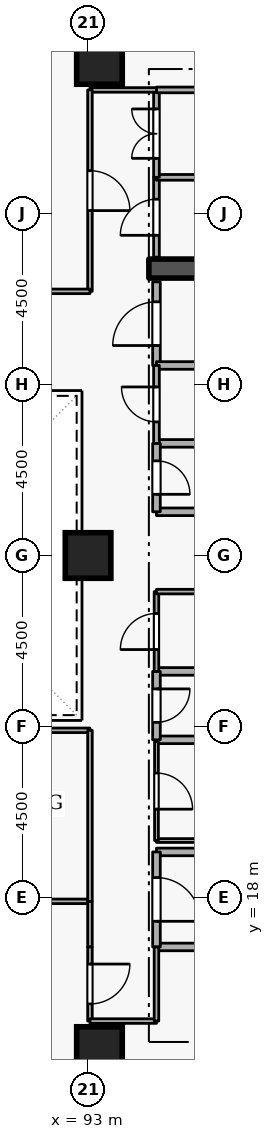
"""IFC4 building model, lengths in metres.
Left out: names, types, materials, properties, quantities, classifications, styles, units other than length and angle.
Written with IfcOpenShell. Run it as: python <this file> out.ifc"""

import sys

from ifc_helpers import new_model, si_unit, direction, frame, frame_2d, origin, origin_2d, place, context, subcontext, project, spatial, rectangle, extrude, element, fill, save


model = new_model("IFC4")
c1 = context("Model", 3, precision=1e-05, world=origin(), true_north=direction((0.0, 1.0)))
c2 = subcontext(c1, "Body", "Model", "MODEL_VIEW")
j1 = project(units=[si_unit("LENGTHUNIT", "METRE"), si_unit("PLANEANGLEUNIT", "RADIAN")], contexts=[c1])
p1 = place(None, origin())
s1 = spatial("IfcSite", under=j1, at=p1, CompositionType="ELEMENT")
p2 = place(p1, origin())
s2 = spatial("IfcBuilding", under=s1, at=p2, CompositionType="ELEMENT")
p3 = place(p2, frame((0.0, 0.0, 130.5)))
s3 = spatial("IfcBuildingStorey", under=s2, at=p3, CompositionType="ELEMENT", Elevation=130.5)
p4 = place(p3, frame((94.6, 34.55, 0.0), z_axis=(0.0, 0.0, 1.0), x_axis=(1.0, 0.0, 0.0)))
e1 = element("IfcWall", 1, at=p4, inside=s3, PredefinedType="SHEAR", context=c2, shape_type="SweptSolid", body=[
    extrude(rectangle(XDim=5.8, YDim=0.5, at=frame_2d((2.9, 0.0))), origin(), (0.0, 0.0, 1.0), 3.6),
])
for number, where, z_axis, x_axis in (
    (2, (93.3, 14.0, 0.0), (0.0, 0.0, 1.0), (1.0, 0.0, 0.0)),
    (3, (93.3, 40.0, 0.0), (0.0, 0.0, 1.0), (1.0, 0.0, 0.0)),
    (4, (93.0, 27.0, 0.0), (0.0, 0.0, 1.0), (1.0, 0.0, 0.0)),
):
    element("IfcColumn", number, at=place(p3, frame(where, z_axis=z_axis, x_axis=x_axis)), inside=s3, PredefinedType="COLUMN", context=c2, shape_type="SweptSolid", body=[
        extrude(rectangle(XDim=1.2, YDim=1.2, at=origin_2d()), origin(), (0.0, 0.0, 1.0), 3.6),
    ])
p5 = place(p3, frame((94.8, 16.7, 0.0), z_axis=(0.0, 0.0, 1.0), x_axis=(1.0, 0.0, 0.0)))
e5 = element("IfcWall", 5, at=p5, inside=s3, PredefinedType="STANDARD", context=c2, shape_type="SweptSolid", body=[
    extrude(rectangle(XDim=5.7, YDim=0.2, at=frame_2d((2.85, 0.0))), origin(), (0.0, 0.0, 1.0), 3.34),
])
p6 = place(p3, frame((97.1, 19.2, 0.0), z_axis=(0.0, 0.0, 1.0), x_axis=(-1.0, 0.0, 0.0)))
e6 = element("IfcWall", 6, at=p6, inside=s3, PredefinedType="STANDARD", context=c2, shape_type="SweptSolid", body=[
    extrude(rectangle(XDim=2.3, YDim=0.2, at=frame_2d((1.15, 0.0))), origin(), (0.0, 0.0, 1.0), 2.545),
])
p7 = place(p3, frame((94.8, 19.2, 0.0), z_axis=(0.0, 0.0, 1.0), x_axis=(0.0, -1.0, 0.0)))
e7 = element("IfcWall", 7, at=p7, inside=s3, PredefinedType="STANDARD", context=c2, shape_type="SweptSolid", body=[
    extrude(rectangle(XDim=2.5, YDim=0.2, at=frame_2d((1.25, 0.0))), origin(), (0.0, 0.0, 1.0), 3.34),
])
p8 = place(p7, frame((0.675, 0.0, 0.0)))
e8 = element("IfcOpeningElement", 8, at=p8, cuts=e7, PredefinedType="OPENING", context=c2, shape_type="SweptSolid", body=[
    extrude(rectangle(XDim=1.15, YDim=2.1, at=frame_2d((0.575, 1.05))), frame((0.0, 0.11, 0.0), z_axis=(0.0, -1.0, 0.0), x_axis=(1.0, 0.0, 0.0)), (0.0, 0.0, 1.0), 0.22),
])
for number, where, z_axis, x_axis in (
    (9, (94.8, 28.15, 0.0), (0.0, 0.0, 1.0), (1.0, 0.0, 0.0)),
    (10, (96.85, 29.95, 0.0), (0.0, 0.0, 1.0), (-1.0, 0.0, 0.0)),
):
    element("IfcWall", number, at=place(p3, frame(where, z_axis=z_axis, x_axis=x_axis)), inside=s3, PredefinedType="STANDARD", context=c2, shape_type="SweptSolid", body=[
        extrude(rectangle(XDim=2.05, YDim=0.2, at=frame_2d((1.025, 0.0))), origin(), (0.0, 0.0, 1.0), 3.34),
    ])
p9 = place(p3, frame((94.8, 29.95, 0.0), z_axis=(0.0, 0.0, 1.0), x_axis=(0.0, -1.0, 0.0)))
e11 = element("IfcWall", 11, at=p9, inside=s3, PredefinedType="STANDARD", context=c2, shape_type="SweptSolid", body=[
    extrude(rectangle(XDim=1.8, YDim=0.2, at=frame_2d((0.9, 0.0))), origin(), (0.0, 0.0, 1.0), 3.34),
])
p10 = place(p9, frame((0.46, 0.0, 0.0)))
e12 = element("IfcOpeningElement", 12, at=p10, cuts=e11, PredefinedType="OPENING", context=c2, shape_type="SweptSolid", body=[
    extrude(rectangle(XDim=0.88, YDim=2.04, at=frame_2d((0.44, 1.02))), frame((0.0, 0.11, 0.0), z_axis=(0.0, -1.0, 0.0), x_axis=(1.0, 0.0, 0.0)), (0.0, 0.0, 1.0), 0.22),
])
for number, where, z_axis, x_axis in (
    (13, (94.8, 22.15, 0.0), (0.0, 0.0, 1.0), (1.0, 0.0, 0.0)),
    (14, (96.85, 23.95, 0.0), (0.0, 0.0, 1.0), (-1.0, 0.0, 0.0)),
):
    element("IfcWall", number, at=place(p3, frame(where, z_axis=z_axis, x_axis=x_axis)), inside=s3, PredefinedType="STANDARD", context=c2, shape_type="SweptSolid", body=[
        extrude(rectangle(XDim=2.05, YDim=0.2, at=frame_2d((1.025, 0.0))), origin(), (0.0, 0.0, 1.0), 3.34),
    ])
p11 = place(p3, frame((94.8, 23.95, 0.0), z_axis=(0.0, 0.0, 1.0), x_axis=(0.0, -1.0, 0.0)))
e15 = element("IfcWall", 15, at=p11, inside=s3, PredefinedType="STANDARD", context=c2, shape_type="SweptSolid", body=[
    extrude(rectangle(XDim=1.8, YDim=0.2, at=frame_2d((0.9, 0.0))), origin(), (0.0, 0.0, 1.0), 3.34),
])
p12 = place(p11, frame((0.46, 0.0, 0.0)))
e16 = element("IfcOpeningElement", 16, at=p12, cuts=e15, PredefinedType="OPENING", context=c2, shape_type="SweptSolid", body=[
    extrude(rectangle(XDim=0.88, YDim=2.04, at=frame_2d((0.44, 1.02))), frame((0.0, 0.11, 0.0), z_axis=(0.0, -1.0, 0.0), x_axis=(1.0, 0.0, 0.0)), (0.0, 0.0, 1.0), 0.22),
])
p13 = place(p3, frame((94.8, 32.0, 0.0), z_axis=(0.0, 0.0, 1.0), x_axis=(0.0, 1.0, 0.0)))
e17 = element("IfcWall", 17, at=p13, inside=s3, PredefinedType="STANDARD", context=c2, shape_type="SweptSolid", body=[
    extrude(rectangle(XDim=2.2, YDim=0.2, at=frame_2d((1.1, 0.0))), origin(), (0.0, 0.0, 1.0), 3.34),
])
p14 = place(p13, frame((0.525, 0.0, 0.0)))
e18 = element("IfcOpeningElement", 18, at=p14, cuts=e17, PredefinedType="OPENING", context=c2, shape_type="SweptSolid", body=[
    extrude(rectangle(XDim=1.15, YDim=2.1, at=frame_2d((0.575, 1.05))), frame((0.0, 0.11, 0.0), z_axis=(0.0, -1.0, 0.0), x_axis=(1.0, 0.0, 0.0)), (0.0, 0.0, 1.0), 0.22),
])
p15 = place(p3, frame((96.85, 32.0, 0.0), z_axis=(0.0, 0.0, 1.0), x_axis=(-1.0, 0.0, 0.0)))
e19 = element("IfcWall", 19, at=p15, inside=s3, PredefinedType="STANDARD", context=c2, shape_type="SweptSolid", body=[
    extrude(rectangle(XDim=2.05, YDim=0.2, at=frame_2d((1.025, 0.0))), origin(), (0.0, 0.0, 1.0), 3.34),
])
p16 = place(p3, frame((94.8, 19.5, 0.0), z_axis=(0.0, 0.0, 1.0), x_axis=(1.0, 0.0, 0.0)))
e20 = element("IfcWall", 20, at=p16, inside=s3, PredefinedType="PARTITIONING", context=c2, shape_type="SweptSolid", body=[
    extrude(rectangle(XDim=2.05, YDim=0.1, at=frame_2d((1.025, 0.0))), origin(), (0.0, 0.0, 1.0), 2.545),
])
p17 = place(p3, frame((94.8, 22.1, 0.0), z_axis=(0.0, 0.0, 1.0), x_axis=(0.0, -1.0, 0.0)))
e21 = element("IfcWall", 21, at=p17, inside=s3, PredefinedType="PARTITIONING", context=c2, shape_type="SweptSolid", body=[
    extrude(rectangle(XDim=2.6, YDim=0.1, at=frame_2d((1.3, 0.0))), origin(), (0.0, 0.0, 1.0), 3.34),
])
p18 = place(p17, frame((0.825, 0.0, 0.0)))
e22 = element("IfcOpeningElement", 22, at=p18, cuts=e21, PredefinedType="OPENING", context=c2, shape_type="SweptSolid", body=[
    extrude(rectangle(XDim=0.95, YDim=2.1, at=frame_2d((0.475, 1.05))), frame((0.0, 0.06, 0.0), z_axis=(0.0, -1.0, 0.0), x_axis=(1.0, 0.0, 0.0)), (0.0, 0.0, 1.0), 0.12),
])
p19 = place(p3, frame((94.8, 23.95, 0.0), z_axis=(0.0, 0.0, 1.0), x_axis=(0.0, 1.0, 0.0)))
e23 = element("IfcWall", 23, at=p19, inside=s3, PredefinedType="PARTITIONING", context=c2, shape_type="SweptSolid", body=[
    extrude(rectangle(XDim=2.1, YDim=0.12, at=frame_2d((1.05, 0.0))), origin(), (0.0, 0.0, 1.0), 3.34),
])
p20 = place(p19, frame((0.575, 0.0, 0.0)))
e24 = element("IfcOpeningElement", 24, at=p20, cuts=e23, PredefinedType="OPENING", context=c2, shape_type="SweptSolid", body=[
    extrude(rectangle(XDim=0.95, YDim=2.1, at=frame_2d((0.475, 1.05))), frame((0.0, 0.07, 0.0), z_axis=(0.0, -1.0, 0.0), x_axis=(1.0, 0.0, 0.0)), (0.0, 0.0, 1.0), 0.14),
])
p21 = place(p3, frame((94.8, 26.05, 0.0), z_axis=(0.0, 0.0, 1.0), x_axis=(1.0, 0.0, 0.0)))
e25 = element("IfcWall", 25, at=p21, inside=s3, PredefinedType="PARTITIONING", context=c2, shape_type="SweptSolid", body=[
    extrude(rectangle(XDim=2.05, YDim=0.12, at=frame_2d((1.025, 0.0))), origin(), (0.0, 0.0, 1.0), 3.34),
])
p22 = place(p3, frame((94.8, 29.95, 0.0), z_axis=(0.0, 0.0, 1.0), x_axis=(0.0, 1.0, 0.0)))
e26 = element("IfcWall", 26, at=p22, inside=s3, PredefinedType="PARTITIONING", context=c2, shape_type="SweptSolid", body=[
    extrude(rectangle(XDim=2.05, YDim=0.15, at=frame_2d((1.025, 0.0))), origin(), (0.0, 0.0, 1.0), 3.34),
])
p23 = place(p22, frame((0.565, 0.0, 0.0)))
e27 = element("IfcOpeningElement", 27, at=p23, cuts=e26, PredefinedType="OPENING", context=c2, shape_type="SweptSolid", body=[
    extrude(rectangle(XDim=0.92, YDim=2.08, at=frame_2d((0.46, 1.04))), frame((0.0, 0.085, 0.0), z_axis=(0.0, -1.0, 0.0), x_axis=(1.0, 0.0, 0.0)), (0.0, 0.0, 1.0), 0.17),
])
p24 = place(p3, frame((94.8, 34.85, 0.0), z_axis=(0.0, 0.0, 1.0), x_axis=(0.0, 1.0, 0.0)))
e28 = element("IfcWall", 28, at=p24, inside=s3, PredefinedType="PARTITIONING", context=c2, shape_type="SweptSolid", body=[
    extrude(rectangle(XDim=2.1, YDim=0.15, at=frame_2d((1.05, 0.0))), origin(), (0.0, 0.0, 1.0), 3.34),
])
p25 = place(p24, frame((0.575, 0.0, 0.0)))
e29 = element("IfcOpeningElement", 29, at=p25, cuts=e28, PredefinedType="OPENING", context=c2, shape_type="SweptSolid", body=[
    extrude(rectangle(XDim=0.95, YDim=2.1, at=frame_2d((0.475, 1.05))), frame((0.0, 0.085, 0.0), z_axis=(0.0, -1.0, 0.0), x_axis=(1.0, 0.0, 0.0)), (0.0, 0.0, 1.0), 0.17),
])
p26 = place(p3, frame((94.8, 36.95, 0.0), z_axis=(0.0, 0.0, 1.0), x_axis=(1.0, 0.0, 0.0)))
e30 = element("IfcWall", 30, at=p26, inside=s3, PredefinedType="PARTITIONING", context=c2, shape_type="SweptSolid", body=[
    extrude(rectangle(XDim=5.65, YDim=0.15, at=frame_2d((2.825, 0.0))), origin(), (0.0, 0.0, 1.0), 3.34),
])
p27 = place(p3, frame((94.8, 36.95, 0.0), z_axis=(0.0, 0.0, 1.0), x_axis=(0.0, 1.0, 0.0)))
e31 = element("IfcWall", 31, at=p27, inside=s3, PredefinedType="PARTITIONING", context=c2, shape_type="SweptSolid", body=[
    extrude(rectangle(XDim=2.3, YDim=0.15, at=frame_2d((1.15, 0.0))), origin(), (0.0, 0.0, 1.0), 3.34),
])
p28 = place(p27, frame((0.5, 0.0, 0.0)))
e32 = element("IfcOpeningElement", 32, at=p28, cuts=e31, PredefinedType="OPENING", context=c2, shape_type="SweptSolid", body=[
    extrude(rectangle(XDim=1.3, YDim=2.12, at=frame_2d((0.65, 1.06))), frame((0.0, 0.085, 0.0), z_axis=(0.0, -1.0, 0.0), x_axis=(1.0, 0.0, 0.0)), (0.0, 0.0, 1.0), 0.17),
])
p29 = place(p3, frame((94.8, 39.25, 0.0), z_axis=(0.0, 0.0, 1.0), x_axis=(1.0, 0.0, 0.0)))
e33 = element("IfcWall", 33, at=p29, inside=s3, PredefinedType="PARTITIONING", context=c2, shape_type="SweptSolid", body=[
    extrude(rectangle(XDim=5.65, YDim=0.15, at=frame_2d((2.825, 0.0))), origin(), (0.0, 0.0, 1.0), 3.34),
])
p30 = place(p3, frame((88.5, 17.9, 0.0), z_axis=(0.0, 0.0, 1.0), x_axis=(1.0, 0.0, 0.0)))
e34 = element("IfcWall", 34, at=p30, inside=s3, PredefinedType="PARTITIONING", context=c2, shape_type="SweptSolid", body=[
    extrude(rectangle(XDim=4.55, YDim=0.12, at=frame_2d((2.275, 0.0))), origin(), (0.0, 0.0, 1.0), 3.34),
])
p31 = place(p3, frame((93.05, 17.9, 0.0), z_axis=(0.0, 0.0, 1.0), x_axis=(0.0, -1.0, 0.0)))
e35 = element("IfcWall", 35, at=p31, inside=s3, PredefinedType="PARTITIONING", context=c2, shape_type="SweptSolid", body=[
    extrude(rectangle(XDim=1.2, YDim=0.12, at=frame_2d((0.6, 0.0))), origin(), (0.0, 0.0, 1.0), 3.34),
])
p32 = place(p3, frame((93.05, 16.7, 0.0), z_axis=(0.0, 0.0, 1.0), x_axis=(0.0, -1.0, 0.0)))
e36 = element("IfcWall", 36, at=p32, inside=s3, PredefinedType="PARTITIONING", context=c2, shape_type="SweptSolid", body=[
    extrude(rectangle(XDim=1.95, YDim=0.12, at=frame_2d((0.975, 0.0))), origin(), (0.0, 0.0, 1.0), 3.34),
])
p33 = place(p32, frame((0.45, 0.0, 0.0)))
e37 = element("IfcOpeningElement", 37, at=p33, cuts=e36, PredefinedType="OPENING", context=c2, shape_type="SweptSolid", body=[
    extrude(rectangle(XDim=1.05, YDim=2.1, at=frame_2d((0.525, 1.05))), frame((0.0, 0.07, 0.0), z_axis=(0.0, -1.0, 0.0), x_axis=(1.0, 0.0, 0.0)), (0.0, 0.0, 1.0), 0.14),
])
p34 = place(p3, frame((93.05, 14.75, 0.0), z_axis=(0.0, 0.0, 1.0), x_axis=(1.0, 0.0, 0.0)))
e38 = element("IfcWall", 38, at=p34, inside=s3, PredefinedType="PARTITIONING", context=c2, shape_type="SweptSolid", body=[
    extrude(rectangle(XDim=1.75, YDim=0.12, at=frame_2d((0.875, 0.0))), origin(), (0.0, 0.0, 1.0), 3.34),
])
p35 = place(p3, frame((94.8, 14.75, 0.0), z_axis=(0.0, 0.0, 1.0), x_axis=(0.0, 1.0, 0.0)))
e39 = element("IfcWall", 39, at=p35, inside=s3, PredefinedType="PARTITIONING", context=c2, shape_type="SweptSolid", body=[
    extrude(rectangle(XDim=1.95, YDim=0.12, at=frame_2d((0.975, 0.0))), origin(), (0.0, 0.0, 1.0), 3.34),
])
p36 = place(p3, frame((83.95, 22.4, 0.0), z_axis=(0.0, 0.0, 1.0), x_axis=(1.0, 0.0, 0.0)))
e40 = element("IfcWall", 40, at=p36, inside=s3, PredefinedType="PARTITIONING", context=c2, shape_type="SweptSolid", body=[
    extrude(rectangle(XDim=9.1, YDim=0.12, at=frame_2d((4.55, 0.0))), origin(), (0.0, 0.0, 1.0), 3.34),
])
p37 = place(p3, frame((93.05, 22.4, 0.0), z_axis=(0.0, 0.0, 1.0), x_axis=(0.0, -1.0, 0.0)))
e41 = element("IfcWall", 41, at=p37, inside=s3, PredefinedType="PARTITIONING", context=c2, shape_type="SweptSolid", body=[
    extrude(rectangle(XDim=4.5, YDim=0.12, at=frame_2d((2.25, 0.0))), origin(), (0.0, 0.0, 1.0), 3.34),
])
p38 = place(p3, frame((94.8, 39.25, 0.0), z_axis=(0.0, 0.0, 1.0), x_axis=(-1.0, 0.0, 0.0)))
e42 = element("IfcWall", 42, at=p38, inside=s3, PredefinedType="PARTITIONING", context=c2, shape_type="SweptSolid", body=[
    extrude(rectangle(XDim=1.75, YDim=0.12, at=frame_2d((0.875, 0.0))), origin(), (0.0, 0.0, 1.0), 3.34),
])
p39 = place(p3, frame((93.05, 39.25, 0.0), z_axis=(0.0, 0.0, 1.0), x_axis=(0.0, -1.0, 0.0)))
e43 = element("IfcWall", 43, at=p39, inside=s3, PredefinedType="PARTITIONING", context=c2, shape_type="SweptSolid", body=[
    extrude(rectangle(XDim=5.3, YDim=0.12, at=frame_2d((2.65, 0.0))), origin(), (0.0, 0.0, 1.0), 3.34),
])
p40 = place(p39, frame((2.125, 0.0, 0.0)))
e44 = element("IfcOpeningElement", 44, at=p40, cuts=e43, PredefinedType="OPENING", context=c2, shape_type="SweptSolid", body=[
    extrude(rectangle(XDim=1.05, YDim=2.1, at=frame_2d((0.525, 1.05))), frame((0.0, 0.07, 0.0), z_axis=(0.0, -1.0, 0.0), x_axis=(1.0, 0.0, 0.0)), (0.0, 0.0, 1.0), 0.14),
])
p41 = place(p3, frame((93.05, 33.95, 0.0), z_axis=(0.0, 0.0, 1.0), x_axis=(-1.0, 0.0, 0.0)))
e45 = element("IfcWall", 45, at=p41, inside=s3, PredefinedType="PARTITIONING", context=c2, shape_type="SweptSolid", body=[
    extrude(rectangle(XDim=2.95, YDim=0.12, at=frame_2d((1.475, 0.0))), origin(), (0.0, 0.0, 1.0), 3.34),
])
p42 = place(p8, origin())
e46 = element("IfcDoor", 46, at=p42, inside=s3, OperationType="SINGLE_SWING_RIGHT", PredefinedType="DOOR", context=c2, shape_type="SweptSolid", body=[
    extrude(rectangle(XDim=1.15, YDim=2.1, at=frame_2d((0.575, 1.05))), frame((0.0, 0.025, 0.0), z_axis=(0.0, -1.0, 0.0), x_axis=(1.0, 0.0, 0.0)), (0.0, 0.0, 1.0), 0.05),
])
fill(e8, e46)
p43 = place(p10, origin())
e47 = element("IfcDoor", 47, at=p43, inside=s3, OperationType="SINGLE_SWING_RIGHT", PredefinedType="DOOR", context=c2, shape_type="SweptSolid", body=[
    extrude(rectangle(XDim=0.88, YDim=2.04, at=frame_2d((0.44, 1.02))), frame((0.0, 0.025, 0.0), z_axis=(0.0, -1.0, 0.0), x_axis=(1.0, 0.0, 0.0)), (0.0, 0.0, 1.0), 0.05),
])
fill(e12, e47)
p44 = place(p12, origin())
e48 = element("IfcDoor", 48, at=p44, inside=s3, OperationType="SINGLE_SWING_LEFT", PredefinedType="DOOR", context=c2, shape_type="SweptSolid", body=[
    extrude(rectangle(XDim=0.88, YDim=2.04, at=frame_2d((0.44, 1.02))), frame((0.0, 0.025, 0.0), z_axis=(0.0, -1.0, 0.0), x_axis=(1.0, 0.0, 0.0)), (0.0, 0.0, 1.0), 0.05),
])
fill(e16, e48)
p45 = place(p18, origin())
e49 = element("IfcDoor", 49, at=p45, inside=s3, OperationType="SINGLE_SWING_RIGHT", PredefinedType="DOOR", context=c2, shape_type="SweptSolid", body=[
    extrude(rectangle(XDim=0.95, YDim=2.1, at=frame_2d((0.475, 1.05))), frame((0.0, 0.025, 0.0), z_axis=(0.0, -1.0, 0.0), x_axis=(1.0, 0.0, 0.0)), (0.0, 0.0, 1.0), 0.05),
])
fill(e22, e49)
p46 = place(p20, origin())
e50 = element("IfcDoor", 50, at=p46, inside=s3, OperationType="SINGLE_SWING_LEFT", PredefinedType="DOOR", context=c2, shape_type="SweptSolid", body=[
    extrude(rectangle(XDim=0.95, YDim=2.1, at=frame_2d((0.475, 1.05))), frame((0.0, 0.025, 0.0), z_axis=(0.0, -1.0, 0.0), x_axis=(1.0, 0.0, 0.0)), (0.0, 0.0, 1.0), 0.05),
])
fill(e24, e50)
p47 = place(p23, origin())
e51 = element("IfcDoor", 51, at=p47, inside=s3, OperationType="SINGLE_SWING_RIGHT", PredefinedType="DOOR", context=c2, shape_type="SweptSolid", body=[
    extrude(rectangle(XDim=0.92, YDim=2.08, at=frame_2d((0.46, 1.04))), frame((0.0, 0.025, 0.0), z_axis=(0.0, -1.0, 0.0), x_axis=(1.0, 0.0, 0.0)), (0.0, 0.0, 1.0), 0.05),
])
fill(e27, e51)
p48 = place(p14, origin())
e52 = element("IfcDoor", 52, at=p48, inside=s3, OperationType="SINGLE_SWING_LEFT", PredefinedType="DOOR", context=c2, shape_type="SweptSolid", body=[
    extrude(rectangle(XDim=1.15, YDim=2.1, at=frame_2d((0.575, 1.05))), frame((0.0, 0.025, 0.0), z_axis=(0.0, -1.0, 0.0), x_axis=(1.0, 0.0, 0.0)), (0.0, 0.0, 1.0), 0.05),
])
fill(e18, e52)
p49 = place(p25, origin())
e53 = element("IfcDoor", 53, at=p49, inside=s3, OperationType="SINGLE_SWING_LEFT", PredefinedType="DOOR", context=c2, shape_type="SweptSolid", body=[
    extrude(rectangle(XDim=0.95, YDim=2.1, at=frame_2d((0.475, 1.05))), frame((0.0, 0.025, 0.0), z_axis=(0.0, -1.0, 0.0), x_axis=(1.0, 0.0, 0.0)), (0.0, 0.0, 1.0), 0.05),
])
fill(e29, e53)
p50 = place(p28, origin())
e54 = element("IfcDoor", 54, at=p50, inside=s3, OperationType="DOUBLE_DOOR_SINGLE_SWING", PredefinedType="DOOR", context=c2, shape_type="SweptSolid", body=[
    extrude(rectangle(XDim=1.3, YDim=2.12, at=frame_2d((0.65, 1.06))), frame((0.0, 0.025, 0.0), z_axis=(0.0, -1.0, 0.0), x_axis=(1.0, 0.0, 0.0)), (0.0, 0.0, 1.0), 0.05),
])
fill(e32, e54)
p51 = place(p33, origin())
e55 = element("IfcDoor", 55, at=p51, inside=s3, OperationType="SINGLE_SWING_LEFT", PredefinedType="DOOR", context=c2, shape_type="SweptSolid", body=[
    extrude(rectangle(XDim=1.05, YDim=2.1, at=frame_2d((0.525, 1.05))), frame((0.0, 0.025, 0.0), z_axis=(0.0, -1.0, 0.0), x_axis=(1.0, 0.0, 0.0)), (0.0, 0.0, 1.0), 0.05),
])
fill(e37, e55)
p52 = place(p40, origin())
e56 = element("IfcDoor", 56, at=p52, inside=s3, OperationType="SINGLE_SWING_RIGHT", PredefinedType="DOOR", context=c2, shape_type="SweptSolid", body=[
    extrude(rectangle(XDim=1.05, YDim=2.1, at=frame_2d((0.525, 1.05))), frame((0.0, 0.025, 0.0), z_axis=(0.0, -1.0, 0.0), x_axis=(1.0, 0.0, 0.0)), (0.0, 0.0, 1.0), 0.05),
])
fill(e44, e56)
save(model, sys.argv[1])
